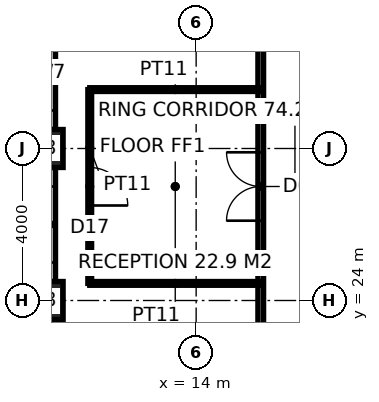
"""IFC4 building model, lengths in metres.
Left out: names, types, materials, properties, quantities, classifications, styles, units other than length and angle.
Written with IfcOpenShell. Run it as: python <this file> out.ifc"""

import sys

from ifc_helpers import new_model, si_unit, direction, frame, frame_2d, origin, origin_2d, place, context, subcontext, project, spatial, rectangle, hollow_rectangle, extrude, element, fill, save


model = new_model("IFC4")
c1 = context("Model", 3, precision=1e-05, world=origin(), true_north=direction((0.0, 1.0)))
c2 = subcontext(c1, "Body", "Model", "MODEL_VIEW")
j1 = project(units=[si_unit("LENGTHUNIT", "METRE"), si_unit("PLANEANGLEUNIT", "RADIAN")], contexts=[c1])
p1 = place(None, origin())
s1 = spatial("IfcSite", under=j1, at=p1, CompositionType="ELEMENT")
p2 = place(p1, origin())
s2 = spatial("IfcBuilding", under=s1, at=p2, CompositionType="ELEMENT")
p3 = place(p2, frame((0.0, 0.0, 234.2)))
s3 = spatial("IfcBuildingStorey", under=s2, at=p3, CompositionType="ELEMENT", Elevation=234.2)
for number, where, z_axis, x_axis in (
    (1, (10.0, 24.0, 0.0), (0.0, 0.0, 1.0), (1.0, 0.0, 0.0)),
    (2, (10.0, 28.0, 0.0), (0.0, 0.0, 1.0), (1.0, 0.0, 0.0)),
):
    element("IfcColumn", number, at=place(p3, frame(where, z_axis=z_axis, x_axis=x_axis)), inside=s3, PredefinedType="COLUMN", context=c2, shape_type="SweptSolid", body=[
        extrude(hollow_rectangle(XDim=1.0, YDim=1.0, WallThickness=0.125, at=origin_2d()), origin(), (0.0, 0.0, 1.0), 4.0),
    ])
p4 = place(p3, frame((15.7, 15.625, 0.0), z_axis=(0.0, 0.0, 1.0), x_axis=(0.0, 1.0, 0.0)))
e3 = element("IfcWall", 3, at=p4, inside=s3, PredefinedType="PARTITIONING", context=c2, shape_type="SweptSolid", body=[
    extrude(rectangle(XDim=22.75, YDim=0.15, at=frame_2d((11.375, 0.0))), origin(), (0.0, 0.0, 1.0), 3.85),
])
p5 = place(p4, frame((10.475, 0.0, 0.0)))
e4 = element("IfcOpeningElement", 4, at=p5, cuts=e3, PredefinedType="OPENING", context=c2, shape_type="SweptSolid", body=[
    extrude(rectangle(XDim=1.8, YDim=2.4, at=frame_2d((0.9, 1.2))), frame((0.0, 0.085, 0.0), z_axis=(0.0, -1.0, 0.0), x_axis=(1.0, 0.0, 0.0)), (0.0, 0.0, 1.0), 0.17),
])
p6 = place(p3, frame((15.7, 29.55, 0.0), z_axis=(0.0, 0.0, 1.0), x_axis=(-1.0, 0.0, 0.0)))
e5 = element("IfcWall", 5, at=p6, inside=s3, PredefinedType="PARTITIONING", context=c2, shape_type="SweptSolid", body=[
    extrude(rectangle(XDim=4.5, YDim=0.1, at=frame_2d((2.25, 0.0))), origin(), (0.0, 0.0, 1.0), 3.85),
])
p7 = place(p3, frame((11.2, 29.55, 0.0), z_axis=(0.0, 0.0, 1.0), x_axis=(0.0, -1.0, 0.0)))
e6 = element("IfcWall", 6, at=p7, inside=s3, PredefinedType="PARTITIONING", context=c2, shape_type="SweptSolid", body=[
    extrude(rectangle(XDim=5.1, YDim=0.1, at=frame_2d((2.55, 0.0))), origin(), (0.0, 0.0, 1.0), 3.85),
])
p8 = place(p7, frame((2.05, 0.0, 0.0)))
e7 = element("IfcOpeningElement", 7, at=p8, cuts=e6, PredefinedType="OPENING", context=c2, shape_type="SweptSolid", body=[
    extrude(rectangle(XDim=1.0, YDim=2.2, at=frame_2d((0.5, 1.1))), frame((0.0, 0.06, 0.0), z_axis=(0.0, -1.0, 0.0), x_axis=(1.0, 0.0, 0.0)), (0.0, 0.0, 1.0), 0.12),
])
p9 = place(p3, frame((11.2, 24.45, 0.0), z_axis=(0.0, 0.0, 1.0), x_axis=(1.0, 0.0, 0.0)))
e8 = element("IfcWall", 8, at=p9, inside=s3, PredefinedType="PARTITIONING", context=c2, shape_type="SweptSolid", body=[
    extrude(rectangle(XDim=4.5, YDim=0.1, at=frame_2d((2.25, 0.0))), origin(), (0.0, 0.0, 1.0), 2.65),
])
p10 = place(p3, frame((10.15, 23.5, 0.0), z_axis=(0.0, 0.0, 1.0), x_axis=(0.0, -1.0, 0.0)))
e9 = element("IfcWall", 9, at=p10, inside=s3, PredefinedType="ELEMENTEDWALL", context=c2, shape_type="SweptSolid", body=[
    extrude(rectangle(XDim=3.0, YDim=0.3, at=frame_2d((1.5, 0.0))), origin(), (0.0, 0.0, 1.0), 2.95),
])
p11 = place(p10, frame((0.5, 0.0, 0.8)))
e10 = element("IfcOpeningElement", 10, at=p11, cuts=e9, PredefinedType="OPENING", context=c2, shape_type="SweptSolid", body=[
    extrude(rectangle(XDim=2.0, YDim=1.8, at=frame_2d((1.0, 0.9))), frame((0.0, 0.16, 0.0), z_axis=(0.0, -1.0, 0.0), x_axis=(1.0, 0.0, 0.0)), (0.0, 0.0, 1.0), 0.32),
])
p12 = place(p3, frame((10.15, 27.5, 0.0), z_axis=(0.0, 0.0, 1.0), x_axis=(0.0, -1.0, 0.0)))
e11 = element("IfcWall", 11, at=p12, inside=s3, PredefinedType="ELEMENTEDWALL", context=c2, shape_type="SweptSolid", body=[
    extrude(rectangle(XDim=3.0, YDim=0.3, at=frame_2d((1.5, 0.0))), origin(), (0.0, 0.0, 1.0), 2.95),
])
p13 = place(p12, frame((0.5, 0.0, 0.8)))
e12 = element("IfcOpeningElement", 12, at=p13, cuts=e11, PredefinedType="OPENING", context=c2, shape_type="SweptSolid", body=[
    extrude(rectangle(XDim=2.0, YDim=1.8, at=frame_2d((1.0, 0.9))), frame((0.0, 0.16, 0.0), z_axis=(0.0, -1.0, 0.0), x_axis=(1.0, 0.0, 0.0)), (0.0, 0.0, 1.0), 0.32),
])
p14 = place(p3, frame((10.15, 31.5, 0.0), z_axis=(0.0, 0.0, 1.0), x_axis=(0.0, -1.0, 0.0)))
e13 = element("IfcWall", 13, at=p14, inside=s3, PredefinedType="ELEMENTEDWALL", context=c2, shape_type="SweptSolid", body=[
    extrude(rectangle(XDim=3.0, YDim=0.3, at=frame_2d((1.5, 0.0))), origin(), (0.0, 0.0, 1.0), 2.95),
])
p15 = place(p14, frame((0.5, 0.0, 0.8)))
e14 = element("IfcOpeningElement", 14, at=p15, cuts=e13, PredefinedType="OPENING", context=c2, shape_type="SweptSolid", body=[
    extrude(rectangle(XDim=2.0, YDim=1.8, at=frame_2d((1.0, 0.9))), frame((0.0, 0.16, 0.0), z_axis=(0.0, -1.0, 0.0), x_axis=(1.0, 0.0, 0.0)), (0.0, 0.0, 1.0), 0.32),
])
p16 = place(p5, origin())
e15 = element("IfcDoor", 15, at=p16, inside=s3, OperationType="DOUBLE_DOOR_DOUBLE_SWING", PredefinedType="DOOR", context=c2, shape_type="SweptSolid", body=[
    extrude(rectangle(XDim=1.8, YDim=2.4, at=frame_2d((0.9, 1.2))), frame((0.0, 0.025, 0.0), z_axis=(0.0, -1.0, 0.0), x_axis=(1.0, 0.0, 0.0)), (0.0, 0.0, 1.0), 0.05),
])
fill(e4, e15)
p17 = place(p8, origin())
e16 = element("IfcDoor", 16, at=p17, inside=s3, OperationType="SINGLE_SWING_RIGHT", PredefinedType="DOOR", context=c2, shape_type="SweptSolid", body=[
    extrude(rectangle(XDim=1.0, YDim=2.2, at=frame_2d((0.5, 1.1))), frame((0.0, 0.025, 0.0), z_axis=(0.0, -1.0, 0.0), x_axis=(1.0, 0.0, 0.0)), (0.0, 0.0, 1.0), 0.05),
])
fill(e7, e16)
save(model, sys.argv[1])
